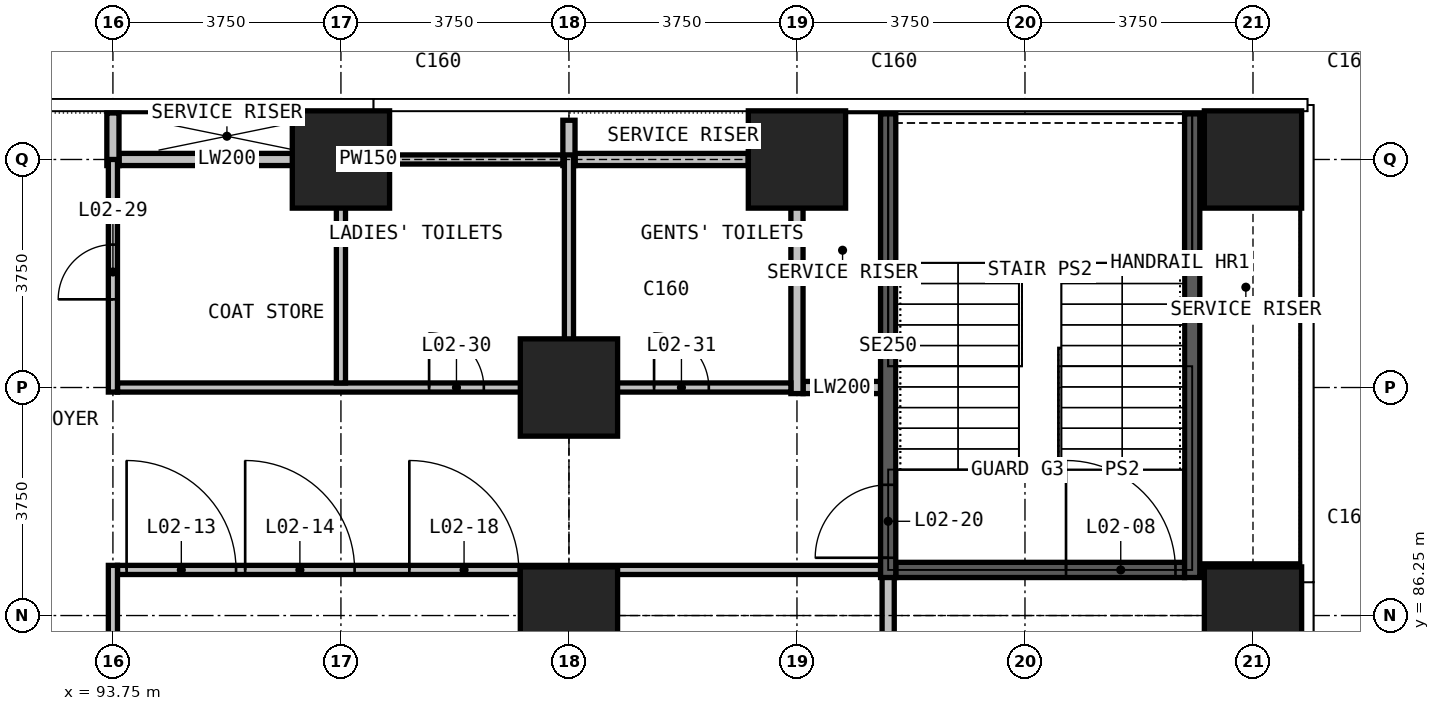
"""IFC4 building model, lengths in metres.
Left out: names, types, materials, properties, quantities, classifications, styles, units other than length and angle.
Written with IfcOpenShell. Run it as: python <this file> out.ifc"""

import sys

from ifc_helpers import new_model, si_unit, direction, frame, frame_2d, origin, origin_2d, place, context, subcontext, project, spatial, rectangle, extrude, element, fill, save


model = new_model("IFC4")
c1 = context("Model", 3, precision=1e-05, world=origin(), true_north=direction((0.0, 1.0)))
c2 = subcontext(c1, "Body", "Model", "MODEL_VIEW")
j1 = project(units=[si_unit("LENGTHUNIT", "METRE"), si_unit("PLANEANGLEUNIT", "RADIAN")], contexts=[c1])
p1 = place(None, origin())
s1 = spatial("IfcSite", under=j1, at=p1, CompositionType="ELEMENT")
p2 = place(p1, origin())
s2 = spatial("IfcBuilding", under=s1, at=p2, CompositionType="ELEMENT")
p3 = place(p2, frame((0.0, 0.0, 16.5)))
s3 = spatial("IfcBuildingStorey", under=s2, at=p3, CompositionType="ELEMENT", Elevation=16.5)
for number, where, z_axis, x_axis in (
    (1, (97.5, 93.75, 0.0), (0.0, 0.0, 1.0), (1.0, 0.0, 0.0)),
    (2, (101.25, 86.25, 0.0), (0.0, 0.0, 1.0), (1.0, 0.0, 0.0)),
    (3, (101.25, 90.0, 0.0), (0.0, 0.0, 1.0), (1.0, 0.0, 0.0)),
    (4, (105.0, 93.75, 0.0), (0.0, 0.0, 1.0), (1.0, 0.0, 0.0)),
    (5, (112.5, 86.25, 0.0), (0.0, 0.0, 1.0), (1.0, 0.0, 0.0)),
    (6, (112.5, 93.75, 0.0), (0.0, 0.0, 1.0), (1.0, 0.0, 0.0)),
):
    element("IfcColumn", number, at=place(p3, frame(where, z_axis=z_axis, x_axis=x_axis)), inside=s3, PredefinedType="COLUMN", context=c2, shape_type="SweptSolid", body=[
        extrude(rectangle(XDim=1.6, YDim=1.6, at=origin_2d()), origin(), (0.0, 0.0, 1.0), 7.5),
    ])
p4 = place(p3, frame((111.625, 87.0, 0.0), z_axis=(0.0, 0.0, 1.0), x_axis=(1.0, 0.0, 0.0)))
e7 = element("IfcWall", 7, at=p4, inside=s3, PredefinedType="PARTITIONING", context=c2, shape_type="SweptSolid", body=[
    extrude(rectangle(XDim=1.64, YDim=0.2, at=frame_2d((0.82, 0.0))), origin(), (0.0, 0.0, 1.0), 7.15),
])
p5 = place(p3, frame((105.1, 90.0, 0.0), z_axis=(0.0, 0.0, 1.0), x_axis=(1.0, 0.0, 0.0)))
e8 = element("IfcWall", 8, at=p5, inside=s3, PredefinedType="PARTITIONING", context=c2, shape_type="SweptSolid", body=[
    extrude(rectangle(XDim=1.275, YDim=0.2, at=frame_2d((0.637, 0.0))), origin(), (0.0, 0.0, 1.0), 7.15),
])
p6 = place(p3, frame((93.85, 93.75, 0.0), z_axis=(0.0, 0.0, 1.0), x_axis=(1.0, 0.0, 0.0)))
e9 = element("IfcWall", 9, at=p6, inside=s3, PredefinedType="PARTITIONING", context=c2, shape_type="SweptSolid", body=[
    extrude(rectangle(XDim=3.55, YDim=0.2, at=frame_2d((1.775, 0.0))), origin(), (0.0, 0.0, 1.0), 7.15),
])
p7 = place(p3, frame((101.35, 93.75, 0.0), z_axis=(0.0, 0.0, 1.0), x_axis=(1.0, 0.0, 0.0)))
e10 = element("IfcWall", 10, at=p7, inside=s3, PredefinedType="PARTITIONING", context=c2, shape_type="SweptSolid", body=[
    extrude(rectangle(XDim=2.851, YDim=0.2, at=frame_2d((1.425, 0.0))), origin(), (0.0, 0.0, 1.0), 6.35),
])
p8 = place(p3, frame((104.201, 93.75, 0.0), z_axis=(0.0, 0.0, 1.0), x_axis=(1.0, 0.0, 0.0)))
e11 = element("IfcWall", 11, at=p8, inside=s3, PredefinedType="PARTITIONING", context=c2, shape_type="SweptSolid", body=[
    extrude(rectangle(XDim=0.699, YDim=0.2, at=frame_2d((0.35, 0.0))), origin(), (0.0, 0.0, 1.0), 7.15),
])
p9 = place(p3, frame((93.75, 93.65, 0.0), z_axis=(0.0, 0.0, 1.0), x_axis=(0.0, 1.0, 0.0)))
e12 = element("IfcWall", 12, at=p9, inside=s3, PredefinedType="PARTITIONING", context=c2, shape_type="SweptSolid", body=[
    extrude(rectangle(XDim=0.865, YDim=0.2, at=frame_2d((0.433, 0.0))), origin(), (0.0, 0.0, 1.0), 7.15),
])
for number, where, z_axis, x_axis in (
    (13, (97.5, 93.65, 0.0), (0.0, 0.0, 1.0), (0.0, 1.0, 0.0)),
    (14, (101.25, 93.65, 0.0), (0.0, 0.0, 1.0), (0.0, 1.0, 0.0)),
):
    element("IfcWall", number, at=place(p3, frame(where, z_axis=z_axis, x_axis=x_axis)), inside=s3, PredefinedType="PARTITIONING", context=c2, shape_type="SweptSolid", body=[
        extrude(rectangle(XDim=0.745, YDim=0.2, at=frame_2d((0.373, 0.0))), origin(), (0.0, 0.0, 1.0), 7.15),
    ])
p10 = place(p3, frame((105.0, 89.9, 0.0), z_axis=(0.0, 0.0, 1.0), x_axis=(0.0, 1.0, 0.0)))
e15 = element("IfcWall", 15, at=p10, inside=s3, PredefinedType="PARTITIONING", context=c2, shape_type="SweptSolid", body=[
    extrude(rectangle(XDim=4.615, YDim=0.2, at=frame_2d((2.308, 0.0))), origin(), (0.0, 0.0, 1.0), 7.15),
])
p11 = place(p3, frame((106.5, 78.625, 0.0), z_axis=(0.0, 0.0, 1.0), x_axis=(0.0, 1.0, 0.0)))
e16 = element("IfcWall", 16, at=p11, inside=s3, PredefinedType="PARTITIONING", context=c2, shape_type="SweptSolid", body=[
    extrude(rectangle(XDim=8.5, YDim=0.2, at=frame_2d((4.25, 0.0))), origin(), (0.0, 0.0, 1.0), 7.15),
])
p12 = place(p11, frame((2.975, 0.0, 0.0)))
e17 = element("IfcOpeningElement", 17, at=p12, cuts=e16, PredefinedType="OPENING", context=c2, shape_type="SweptSolid", body=[
    extrude(rectangle(XDim=1.8, YDim=2.2, at=frame_2d((0.9, 1.1))), frame((0.0, 0.11, 0.0), z_axis=(0.0, -1.0, 0.0), x_axis=(1.0, 0.0, 0.0)), (0.0, 0.0, 1.0), 0.22),
])
p13 = place(p3, frame((93.825, 87.0, 0.0), z_axis=(0.0, 0.0, 1.0), x_axis=(1.0, 0.0, 0.0)))
e18 = element("IfcWall", 18, at=p13, inside=s3, PredefinedType="PARTITIONING", context=c2, shape_type="SweptSolid", body=[
    extrude(rectangle(XDim=12.55, YDim=0.15, at=frame_2d((6.275, 0.0))), origin(), (0.0, 0.0, 1.0), 7.15),
])
p14 = place(p13, frame((0.15, 0.0, 0.0)))
e19 = element("IfcOpeningElement", 19, at=p14, cuts=e18, PredefinedType="OPENING", context=c2, shape_type="SweptSolid", body=[
    extrude(rectangle(XDim=1.8, YDim=2.2, at=frame_2d((0.9, 1.1))), frame((0.0, 0.085, 0.0), z_axis=(0.0, -1.0, 0.0), x_axis=(1.0, 0.0, 0.0)), (0.0, 0.0, 1.0), 0.17),
])
p15 = place(p13, frame((2.1, 0.0, 0.0)))
e20 = element("IfcOpeningElement", 20, at=p15, cuts=e18, PredefinedType="OPENING", context=c2, shape_type="SweptSolid", body=[
    extrude(rectangle(XDim=1.8, YDim=2.2, at=frame_2d((0.9, 1.1))), frame((0.0, 0.085, 0.0), z_axis=(0.0, -1.0, 0.0), x_axis=(1.0, 0.0, 0.0)), (0.0, 0.0, 1.0), 0.17),
])
p16 = place(p13, frame((4.8, 0.0, 0.0)))
e21 = element("IfcOpeningElement", 21, at=p16, cuts=e18, PredefinedType="OPENING", context=c2, shape_type="SweptSolid", body=[
    extrude(rectangle(XDim=1.8, YDim=2.2, at=frame_2d((0.9, 1.1))), frame((0.0, 0.085, 0.0), z_axis=(0.0, -1.0, 0.0), x_axis=(1.0, 0.0, 0.0)), (0.0, 0.0, 1.0), 0.17),
])
p17 = place(p3, frame((93.825, 90.0, 0.0), z_axis=(0.0, 0.0, 1.0), x_axis=(1.0, 0.0, 0.0)))
e22 = element("IfcWall", 22, at=p17, inside=s3, PredefinedType="PARTITIONING", context=c2, shape_type="SweptSolid", body=[
    extrude(rectangle(XDim=11.075, YDim=0.15, at=frame_2d((5.538, 0.0))), origin(), (0.0, 0.0, 1.0), 7.15),
])
p18 = place(p17, frame((5.125, 0.0, 0.0)))
e23 = element("IfcOpeningElement", 23, at=p18, cuts=e22, PredefinedType="OPENING", context=c2, shape_type="SweptSolid", body=[
    extrude(rectangle(XDim=0.9, YDim=2.2, at=frame_2d((0.45, 1.1))), frame((0.0, 0.085, 0.0), z_axis=(0.0, -1.0, 0.0), x_axis=(1.0, 0.0, 0.0)), (0.0, 0.0, 1.0), 0.17),
])
p19 = place(p17, frame((8.825, 0.0, 0.0)))
e24 = element("IfcOpeningElement", 24, at=p19, cuts=e22, PredefinedType="OPENING", context=c2, shape_type="SweptSolid", body=[
    extrude(rectangle(XDim=0.9, YDim=2.2, at=frame_2d((0.45, 1.1))), frame((0.0, 0.085, 0.0), z_axis=(0.0, -1.0, 0.0), x_axis=(1.0, 0.0, 0.0)), (0.0, 0.0, 1.0), 0.17),
])
p20 = place(p3, frame((97.6, 93.75, 0.0), z_axis=(0.0, 0.0, 1.0), x_axis=(1.0, 0.0, 0.0)))
e25 = element("IfcWall", 25, at=p20, inside=s3, PredefinedType="PARTITIONING", context=c2, shape_type="SweptSolid", body=[
    extrude(rectangle(XDim=0.7, YDim=0.15, at=frame_2d((0.35, 0.0))), origin(), (0.0, 0.0, 1.0), 7.15),
])
p21 = place(p3, frame((98.3, 93.75, 0.0), z_axis=(0.0, 0.0, 1.0), x_axis=(1.0, 0.0, 0.0)))
e26 = element("IfcWall", 26, at=p21, inside=s3, PredefinedType="PARTITIONING", context=c2, shape_type="SweptSolid", body=[
    extrude(rectangle(XDim=2.85, YDim=0.15, at=frame_2d((1.425, 0.0))), origin(), (0.0, 0.0, 1.0), 6.35),
])
p22 = place(p3, frame((93.75, 78.9, 0.0), z_axis=(0.0, 0.0, 1.0), x_axis=(0.0, 1.0, 0.0)))
e27 = element("IfcWall", 27, at=p22, inside=s3, PredefinedType="PARTITIONING", context=c2, shape_type="SweptSolid", body=[
    extrude(rectangle(XDim=8.175, YDim=0.15, at=frame_2d((4.087, 0.0))), origin(), (0.0, 0.0, 1.0), 7.15),
])
p23 = place(p22, frame((1.35, 0.0, 0.0)))
e28 = element("IfcOpeningElement", 28, at=p23, cuts=e27, PredefinedType="OPENING", context=c2, shape_type="SweptSolid", body=[
    extrude(rectangle(XDim=1.0, YDim=2.2, at=frame_2d((0.5, 1.1))), frame((0.0, 0.085, 0.0), z_axis=(0.0, -1.0, 0.0), x_axis=(1.0, 0.0, 0.0)), (0.0, 0.0, 1.0), 0.17),
])
p24 = place(p3, frame((93.75, 89.925, 0.0), z_axis=(0.0, 0.0, 1.0), x_axis=(0.0, 1.0, 0.0)))
e29 = element("IfcWall", 29, at=p24, inside=s3, PredefinedType="PARTITIONING", context=c2, shape_type="SweptSolid", body=[
    extrude(rectangle(XDim=3.825, YDim=0.15, at=frame_2d((1.913, 0.0))), origin(), (0.0, 0.0, 1.0), 7.15),
])
p25 = place(p24, frame((1.525, 0.0, 0.0)))
e30 = element("IfcOpeningElement", 30, at=p25, cuts=e29, PredefinedType="OPENING", context=c2, shape_type="SweptSolid", body=[
    extrude(rectangle(XDim=0.9, YDim=2.2, at=frame_2d((0.45, 1.1))), frame((0.0, 0.085, 0.0), z_axis=(0.0, -1.0, 0.0), x_axis=(1.0, 0.0, 0.0)), (0.0, 0.0, 1.0), 0.17),
])
for number, where, z_axis, x_axis in (
    (31, (97.5, 90.075, 0.0), (0.0, 0.0, 1.0), (0.0, 1.0, 0.0)),
    (32, (101.25, 90.075, 0.0), (0.0, 0.0, 1.0), (0.0, 1.0, 0.0)),
):
    element("IfcWall", number, at=place(p3, frame(where, z_axis=z_axis, x_axis=x_axis)), inside=s3, PredefinedType="PARTITIONING", context=c2, shape_type="SweptSolid", body=[
        extrude(rectangle(XDim=3.75, YDim=0.15, at=frame_2d((1.875, 0.0))), origin(), (0.0, 0.0, 1.0), 7.15),
    ])
p26 = place(p3, frame((106.625, 87.0, 0.0), z_axis=(0.0, 0.0, 1.0), x_axis=(1.0, 0.0, 0.0)))
e33 = element("IfcWall", 33, at=p26, inside=s3, PredefinedType="PARTITIONING", context=c2, shape_type="SweptSolid", body=[
    extrude(rectangle(XDim=4.75, YDim=0.25, at=frame_2d((2.375, 0.0))), origin(), (0.0, 0.0, 1.0), 7.15),
])
p27 = place(p26, frame((2.8, 0.0, 0.0)))
e34 = element("IfcOpeningElement", 34, at=p27, cuts=e33, PredefinedType="OPENING", context=c2, shape_type="SweptSolid", body=[
    extrude(rectangle(XDim=1.8, YDim=2.2, at=frame_2d((0.9, 1.1))), frame((0.0, 0.135, 0.0), z_axis=(0.0, -1.0, 0.0), x_axis=(1.0, 0.0, 0.0)), (0.0, 0.0, 1.0), 0.27),
])
p28 = place(p3, frame((106.5, 86.875, 0.0), z_axis=(0.0, 0.0, 1.0), x_axis=(0.0, 1.0, 0.0)))
e35 = element("IfcWall", 35, at=p28, inside=s3, PredefinedType="PARTITIONING", context=c2, shape_type="SweptSolid", body=[
    extrude(rectangle(XDim=7.625, YDim=0.25, at=frame_2d((3.812, 0.0))), origin(), (0.0, 0.0, 1.0), 7.15),
])
p29 = place(p28, frame((0.325, 0.0, 0.0)))
e36 = element("IfcOpeningElement", 36, at=p29, cuts=e35, PredefinedType="OPENING", context=c2, shape_type="SweptSolid", body=[
    extrude(rectangle(XDim=1.2, YDim=2.2, at=frame_2d((0.6, 1.1))), frame((0.0, 0.135, 0.0), z_axis=(0.0, -1.0, 0.0), x_axis=(1.0, 0.0, 0.0)), (0.0, 0.0, 1.0), 0.27),
])
p30 = place(p3, frame((111.5, 86.875, 0.0), z_axis=(0.0, 0.0, 1.0), x_axis=(0.0, 1.0, 0.0)))
e37 = element("IfcWall", 37, at=p30, inside=s3, PredefinedType="PARTITIONING", context=c2, shape_type="SweptSolid", body=[
    extrude(rectangle(XDim=7.625, YDim=0.25, at=frame_2d((3.812, 0.0))), origin(), (0.0, 0.0, 1.0), 7.15),
])
p31 = place(p27, origin())
e38 = element("IfcDoor", 38, at=p31, inside=s3, OperationType="DOUBLE_DOOR_SINGLE_SWING", PredefinedType="DOOR", context=c2, shape_type="SweptSolid", body=[
    extrude(rectangle(XDim=1.8, YDim=2.2, at=frame_2d((0.9, 1.1))), frame((0.0, 0.025, 0.0), z_axis=(0.0, -1.0, 0.0), x_axis=(1.0, 0.0, 0.0)), (0.0, 0.0, 1.0), 0.05),
])
fill(e34, e38)
p32 = place(p14, origin())
e39 = element("IfcDoor", 39, at=p32, inside=s3, OperationType="DOUBLE_DOOR_SINGLE_SWING", PredefinedType="DOOR", context=c2, shape_type="SweptSolid", body=[
    extrude(rectangle(XDim=1.8, YDim=2.2, at=frame_2d((0.9, 1.1))), frame((0.0, 0.025, 0.0), z_axis=(0.0, -1.0, 0.0), x_axis=(1.0, 0.0, 0.0)), (0.0, 0.0, 1.0), 0.05),
])
fill(e19, e39)
p33 = place(p15, origin())
e40 = element("IfcDoor", 40, at=p33, inside=s3, OperationType="DOUBLE_DOOR_SINGLE_SWING", PredefinedType="DOOR", context=c2, shape_type="SweptSolid", body=[
    extrude(rectangle(XDim=1.8, YDim=2.2, at=frame_2d((0.9, 1.1))), frame((0.0, 0.025, 0.0), z_axis=(0.0, -1.0, 0.0), x_axis=(1.0, 0.0, 0.0)), (0.0, 0.0, 1.0), 0.05),
])
fill(e20, e40)
p34 = place(p16, origin())
e41 = element("IfcDoor", 41, at=p34, inside=s3, OperationType="DOUBLE_DOOR_SINGLE_SWING", PredefinedType="DOOR", context=c2, shape_type="SweptSolid", body=[
    extrude(rectangle(XDim=1.8, YDim=2.2, at=frame_2d((0.9, 1.1))), frame((0.0, 0.025, 0.0), z_axis=(0.0, -1.0, 0.0), x_axis=(1.0, 0.0, 0.0)), (0.0, 0.0, 1.0), 0.05),
])
fill(e21, e41)
p35 = place(p29, origin())
e42 = element("IfcDoor", 42, at=p35, inside=s3, OperationType="SINGLE_SWING_LEFT", PredefinedType="DOOR", context=c2, shape_type="SweptSolid", body=[
    extrude(rectangle(XDim=1.2, YDim=2.2, at=frame_2d((0.6, 1.1))), frame((0.0, 0.025, 0.0), z_axis=(0.0, -1.0, 0.0), x_axis=(1.0, 0.0, 0.0)), (0.0, 0.0, 1.0), 0.05),
])
fill(e36, e42)
p36 = place(p25, origin())
e43 = element("IfcDoor", 43, at=p36, inside=s3, OperationType="SINGLE_SWING_LEFT", PredefinedType="DOOR", context=c2, shape_type="SweptSolid", body=[
    extrude(rectangle(XDim=0.9, YDim=2.2, at=frame_2d((0.45, 1.1))), frame((0.0, 0.025, 0.0), z_axis=(0.0, -1.0, 0.0), x_axis=(1.0, 0.0, 0.0)), (0.0, 0.0, 1.0), 0.05),
])
fill(e30, e43)
p37 = place(p18, origin())
e44 = element("IfcDoor", 44, at=p37, inside=s3, OperationType="SINGLE_SWING_RIGHT", PredefinedType="DOOR", context=c2, shape_type="SweptSolid", body=[
    extrude(rectangle(XDim=0.9, YDim=2.2, at=frame_2d((0.45, 1.1))), frame((0.0, 0.025, 0.0), z_axis=(0.0, -1.0, 0.0), x_axis=(1.0, 0.0, 0.0)), (0.0, 0.0, 1.0), 0.05),
])
fill(e23, e44)
p38 = place(p19, origin())
e45 = element("IfcDoor", 45, at=p38, inside=s3, OperationType="SINGLE_SWING_LEFT", PredefinedType="DOOR", context=c2, shape_type="SweptSolid", body=[
    extrude(rectangle(XDim=0.9, YDim=2.2, at=frame_2d((0.45, 1.1))), frame((0.0, 0.025, 0.0), z_axis=(0.0, -1.0, 0.0), x_axis=(1.0, 0.0, 0.0)), (0.0, 0.0, 1.0), 0.05),
])
fill(e24, e45)
save(model, sys.argv[1])
